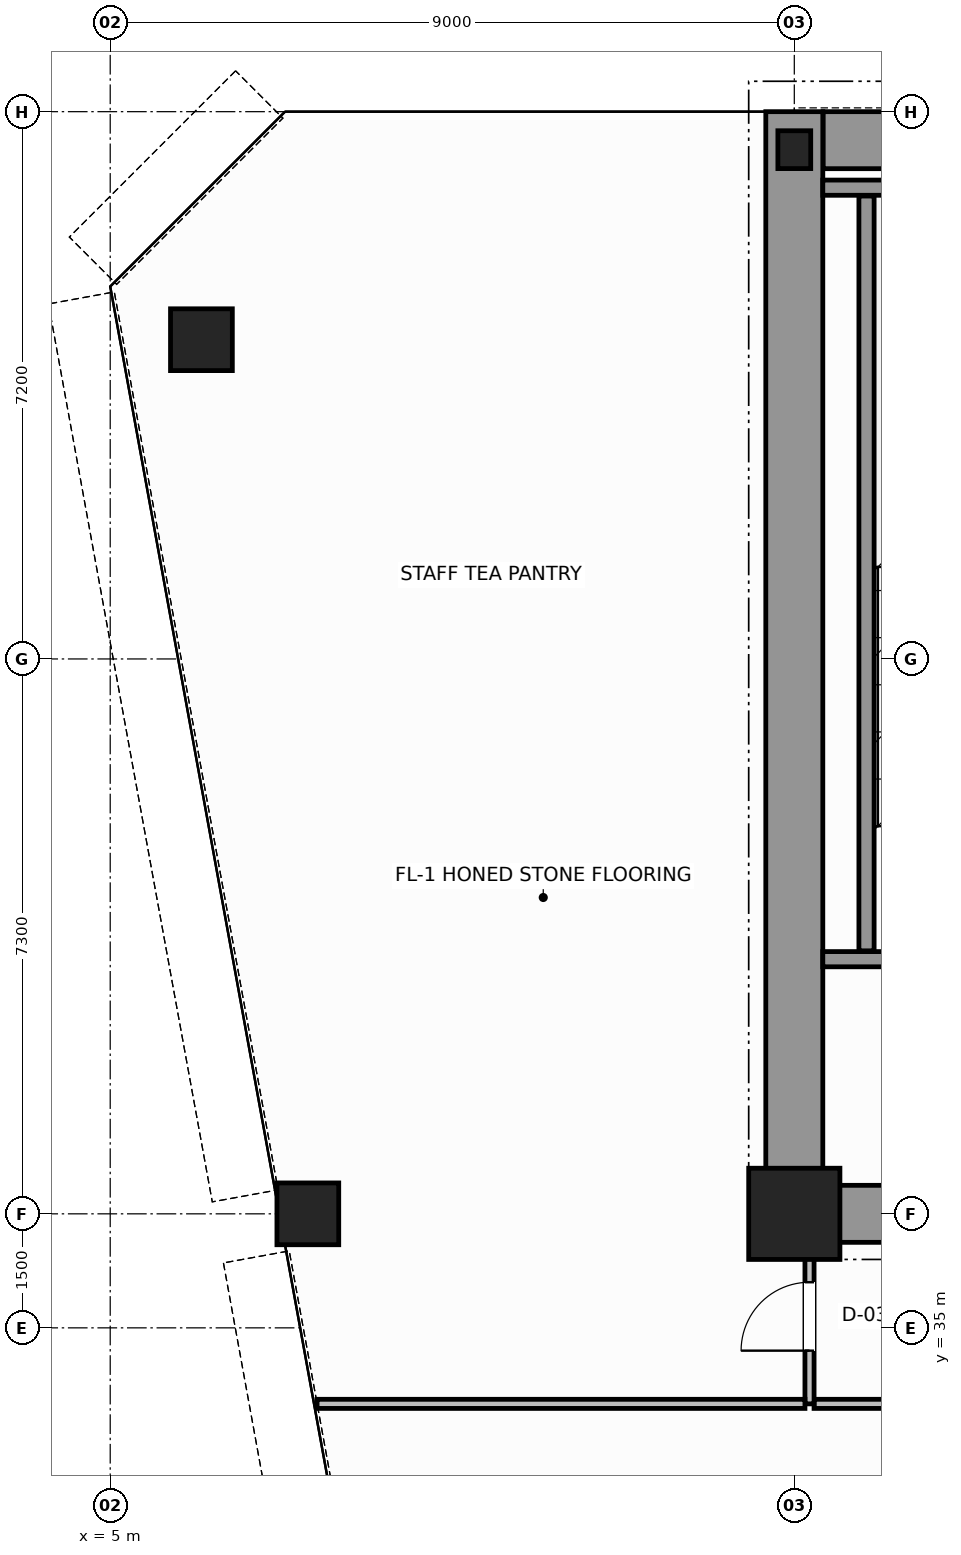
"""IFC4 building model, lengths in metres.
Left out: names, types, materials, properties, quantities, classifications, styles, units other than length and angle.
Written with IfcOpenShell. Run it as: python <this file> out.ifc"""

import sys

from ifc_helpers import new_model, si_unit, direction, frame, frame_2d, origin, origin_2d, place, context, subcontext, project, spatial, rectangle, hollow_circle, i_section, extrude, source, transform, mapped, element, fill, save


model = new_model("IFC4")
c1 = context("Model", 3, precision=1e-05, world=origin(), true_north=direction((0.0, 1.0)))
c2 = subcontext(c1, "Body", "Model", "MODEL_VIEW")
j1 = project(units=[si_unit("LENGTHUNIT", "METRE"), si_unit("PLANEANGLEUNIT", "RADIAN")], contexts=[c1])
p1 = place(None, origin())
s1 = spatial("IfcSite", under=j1, at=p1, CompositionType="ELEMENT")
p2 = place(p1, origin())
s2 = spatial("IfcBuilding", under=s1, at=p2, CompositionType="ELEMENT")
p3 = place(p2, frame((0.0, 0.0, 157.6)))
s3 = spatial("IfcBuildingStorey", under=s2, at=p3, CompositionType="ELEMENT", Elevation=157.6)
m1 = source(origin(), c2, "Body", "SweptSolid", [
    extrude(rectangle(XDim=1.2, YDim=1.2, at=origin_2d()), origin(), (0.0, 0.0, 1.0), 3.8),
])
p4 = place(p3, frame((14.0, 36.5, 0.0), z_axis=(0.0, 0.0, 1.0), x_axis=(1.0, 0.0, 0.0)))
e1 = element("IfcColumn", 1, at=p4, inside=s3, PredefinedType="COLUMN", context=c2, shape_type="MappedRepresentation", body=[
    mapped(m1, transform((0.0, 0.0, 0.0), scale=1.0)),
])
m2 = source(origin(), c2, "Body", "SweptSolid", [
    extrude(i_section(OverallWidth=0.432, OverallDepth=0.498, WebThickness=0.055, FlangeThickness=0.068, FilletRadius=0.015, at=origin_2d()), origin(), (0.0, 0.0, 1.0), 3.8),
])
p5 = place(p3, frame((14.0, 50.5, 0.0), z_axis=(0.0, 0.0, 1.0), x_axis=(1.0, 0.0, 0.0)))
e2 = element("IfcColumn", 2, at=p5, inside=s3, PredefinedType="COLUMN", context=c2, shape_type="MappedRepresentation", body=[
    mapped(m2, transform((0.0, 0.0, 0.0), scale=1.0)),
])
m3 = source(origin(), c2, "Body", "SweptSolid", [
    extrude(hollow_circle(Radius=0.406, WallThickness=0.04, at=origin_2d()), origin(), (0.0, 0.0, 1.0), 3.8),
])
for number, where, z_axis, x_axis in (
    (3, (6.2, 48.0, 0.0), (0.0, 0.0, 1.0), (1.0, 0.0, 0.0)),
    (4, (7.6, 36.5, 0.0), (0.0, 0.0, 1.0), (1.0, 0.0, 0.0)),
):
    element("IfcColumn", number, at=place(p3, frame(where, z_axis=z_axis, x_axis=x_axis)), inside=s3, PredefinedType="COLUMN", context=c2, shape_type="MappedRepresentation", body=[
        mapped(m3, transform((0.0, 0.0, 0.0), scale=1.0)),
    ])
p6 = place(p3, frame((14.379, 50.625, 0.0), z_axis=(0.0, 0.0, 1.0), x_axis=(1.0, 0.0, 0.0)))
e5 = element("IfcWall", 5, at=p6, inside=s3, PredefinedType="SHEAR", context=c2, shape_type="SweptSolid", body=[
    extrude(rectangle(XDim=19.619, YDim=0.75, at=frame_2d((9.81, 0.0))), origin(), (0.0, 0.0, 1.0), 3.8),
])
p7 = place(p3, frame((14.0, 36.5, 0.0), z_axis=(0.0, 0.0, 1.0), x_axis=(0.0, 1.0, 0.0)))
e6 = element("IfcWall", 6, at=p7, inside=s3, PredefinedType="SHEAR", context=c2, shape_type="SweptSolid", body=[
    extrude(rectangle(XDim=14.5, YDim=0.75, at=frame_2d((7.25, 0.0))), origin(), (0.0, 0.0, 1.0), 3.8),
])
p8 = place(p3, frame((14.395, 36.5, 0.0), z_axis=(0.0, 0.0, 1.0), x_axis=(1.0, 0.0, 0.0)))
e7 = element("IfcWall", 7, at=p8, inside=s3, PredefinedType="SHEAR", context=c2, shape_type="SweptSolid", body=[
    extrude(rectangle(XDim=3.805, YDim=0.75, at=frame_2d((1.902, 0.0))), origin(), (0.0, 0.0, 1.0), 2.38),
])
p9 = place(p3, frame((14.375, 39.85, 0.0), z_axis=(0.0, 0.0, 1.0), x_axis=(1.0, 0.0, 0.0)))
e8 = element("IfcWall", 8, at=p9, inside=s3, PredefinedType="SOLIDWALL", context=c2, shape_type="SweptSolid", body=[
    extrude(rectangle(XDim=4.225, YDim=0.2, at=frame_2d((2.113, 0.0))), origin(), (0.0, 0.0, 1.0), 3.8),
])
p10 = place(p9, frame((1.8, 0.0, 0.0)))
e9 = element("IfcOpeningElement", 9, at=p10, cuts=e8, PredefinedType="OPENING", context=c2, shape_type="SweptSolid", body=[
    extrude(rectangle(XDim=1.1, YDim=2.15, at=frame_2d((0.55, 1.075))), frame((0.0, 0.11, 0.0), z_axis=(0.0, -1.0, 0.0), x_axis=(1.0, 0.0, 0.0)), (0.0, 0.0, 1.0), 0.22),
])
p11 = place(p3, frame((14.375, 50.0, 0.0), z_axis=(0.0, 0.0, 1.0), x_axis=(1.0, 0.0, 0.0)))
e10 = element("IfcWall", 10, at=p11, inside=s3, PredefinedType="SOLIDWALL", context=c2, shape_type="SweptSolid", body=[
    extrude(rectangle(XDim=4.225, YDim=0.2, at=frame_2d((2.113, 0.0))), origin(), (0.0, 0.0, 1.0), 3.8),
])
p12 = place(p3, frame((14.95, 39.96, 0.0), z_axis=(0.0, 0.0, 1.0), x_axis=(0.0, 1.0, 0.0)))
e11 = element("IfcWall", 11, at=p12, inside=s3, PredefinedType="SOLIDWALL", context=c2, shape_type="SweptSolid", body=[
    extrude(rectangle(XDim=9.93, YDim=0.2, at=frame_2d((4.965, 0.0))), origin(), (0.0, 0.0, 1.0), 3.8),
])
p13 = place(p3, frame((14.26, 34.0, 0.0), z_axis=(0.0, 0.0, 1.0), x_axis=(1.0, 0.0, 0.0)))
e12 = element("IfcWall", 12, at=p13, inside=s3, PredefinedType="PARTITIONING", context=c2, shape_type="SweptSolid", body=[
    extrude(rectangle(XDim=20.68, YDim=0.12, at=frame_2d((10.34, 0.0))), origin(), (0.0, 0.0, 1.0), 3.58),
])
p14 = place(p3, frame((14.2, 34.0, 0.0), z_axis=(0.0, 0.0, 1.0), x_axis=(0.0, 1.0, 0.0)))
e13 = element("IfcWall", 13, at=p14, inside=s3, PredefinedType="PARTITIONING", context=c2, shape_type="SweptSolid", body=[
    extrude(rectangle(XDim=2.44, YDim=0.12, at=frame_2d((1.22, 0.0))), origin(), (0.0, 0.0, 1.0), 3.58),
])
p15 = place(p14, frame((0.7, 0.0, 0.0)))
e14 = element("IfcOpeningElement", 14, at=p15, cuts=e13, PredefinedType="OPENING", context=c2, shape_type="SweptSolid", body=[
    extrude(rectangle(XDim=0.9, YDim=2.15, at=frame_2d((0.45, 1.075))), frame((0.0, 0.07, 0.0), z_axis=(0.0, -1.0, 0.0), x_axis=(1.0, 0.0, 0.0)), (0.0, 0.0, 1.0), 0.14),
])
p16 = place(p3, frame((7.721, 34.0, 0.0), z_axis=(0.0, 0.0, 1.0), x_axis=(1.0, 0.0, 0.0)))
e15 = element("IfcWall", 15, at=p16, inside=s3, PredefinedType="PARTITIONING", context=c2, shape_type="SweptSolid", body=[
    extrude(rectangle(XDim=6.418, YDim=0.12, at=frame_2d((3.209, 0.0))), origin(), (0.0, 0.0, 1.0), 3.58),
])
m4 = source(origin(), c2, "Body", "SweptSolid", [
    extrude(rectangle(XDim=0.9, YDim=2.15, at=frame_2d((0.45, 1.075))), frame((0.0, 0.025, 0.0), z_axis=(0.0, -1.0, 0.0), x_axis=(1.0, 0.0, 0.0)), (0.0, 0.0, 1.0), 0.05),
])
p17 = place(p15, origin())
e16 = element("IfcDoor", 16, at=p17, inside=s3, OperationType="SINGLE_SWING_LEFT", PredefinedType="DOOR", context=c2, shape_type="MappedRepresentation", body=[
    mapped(m4, transform((0.0, 0.0, 0.0), scale=1.0)),
])
fill(e14, e16)
save(model, sys.argv[1])
